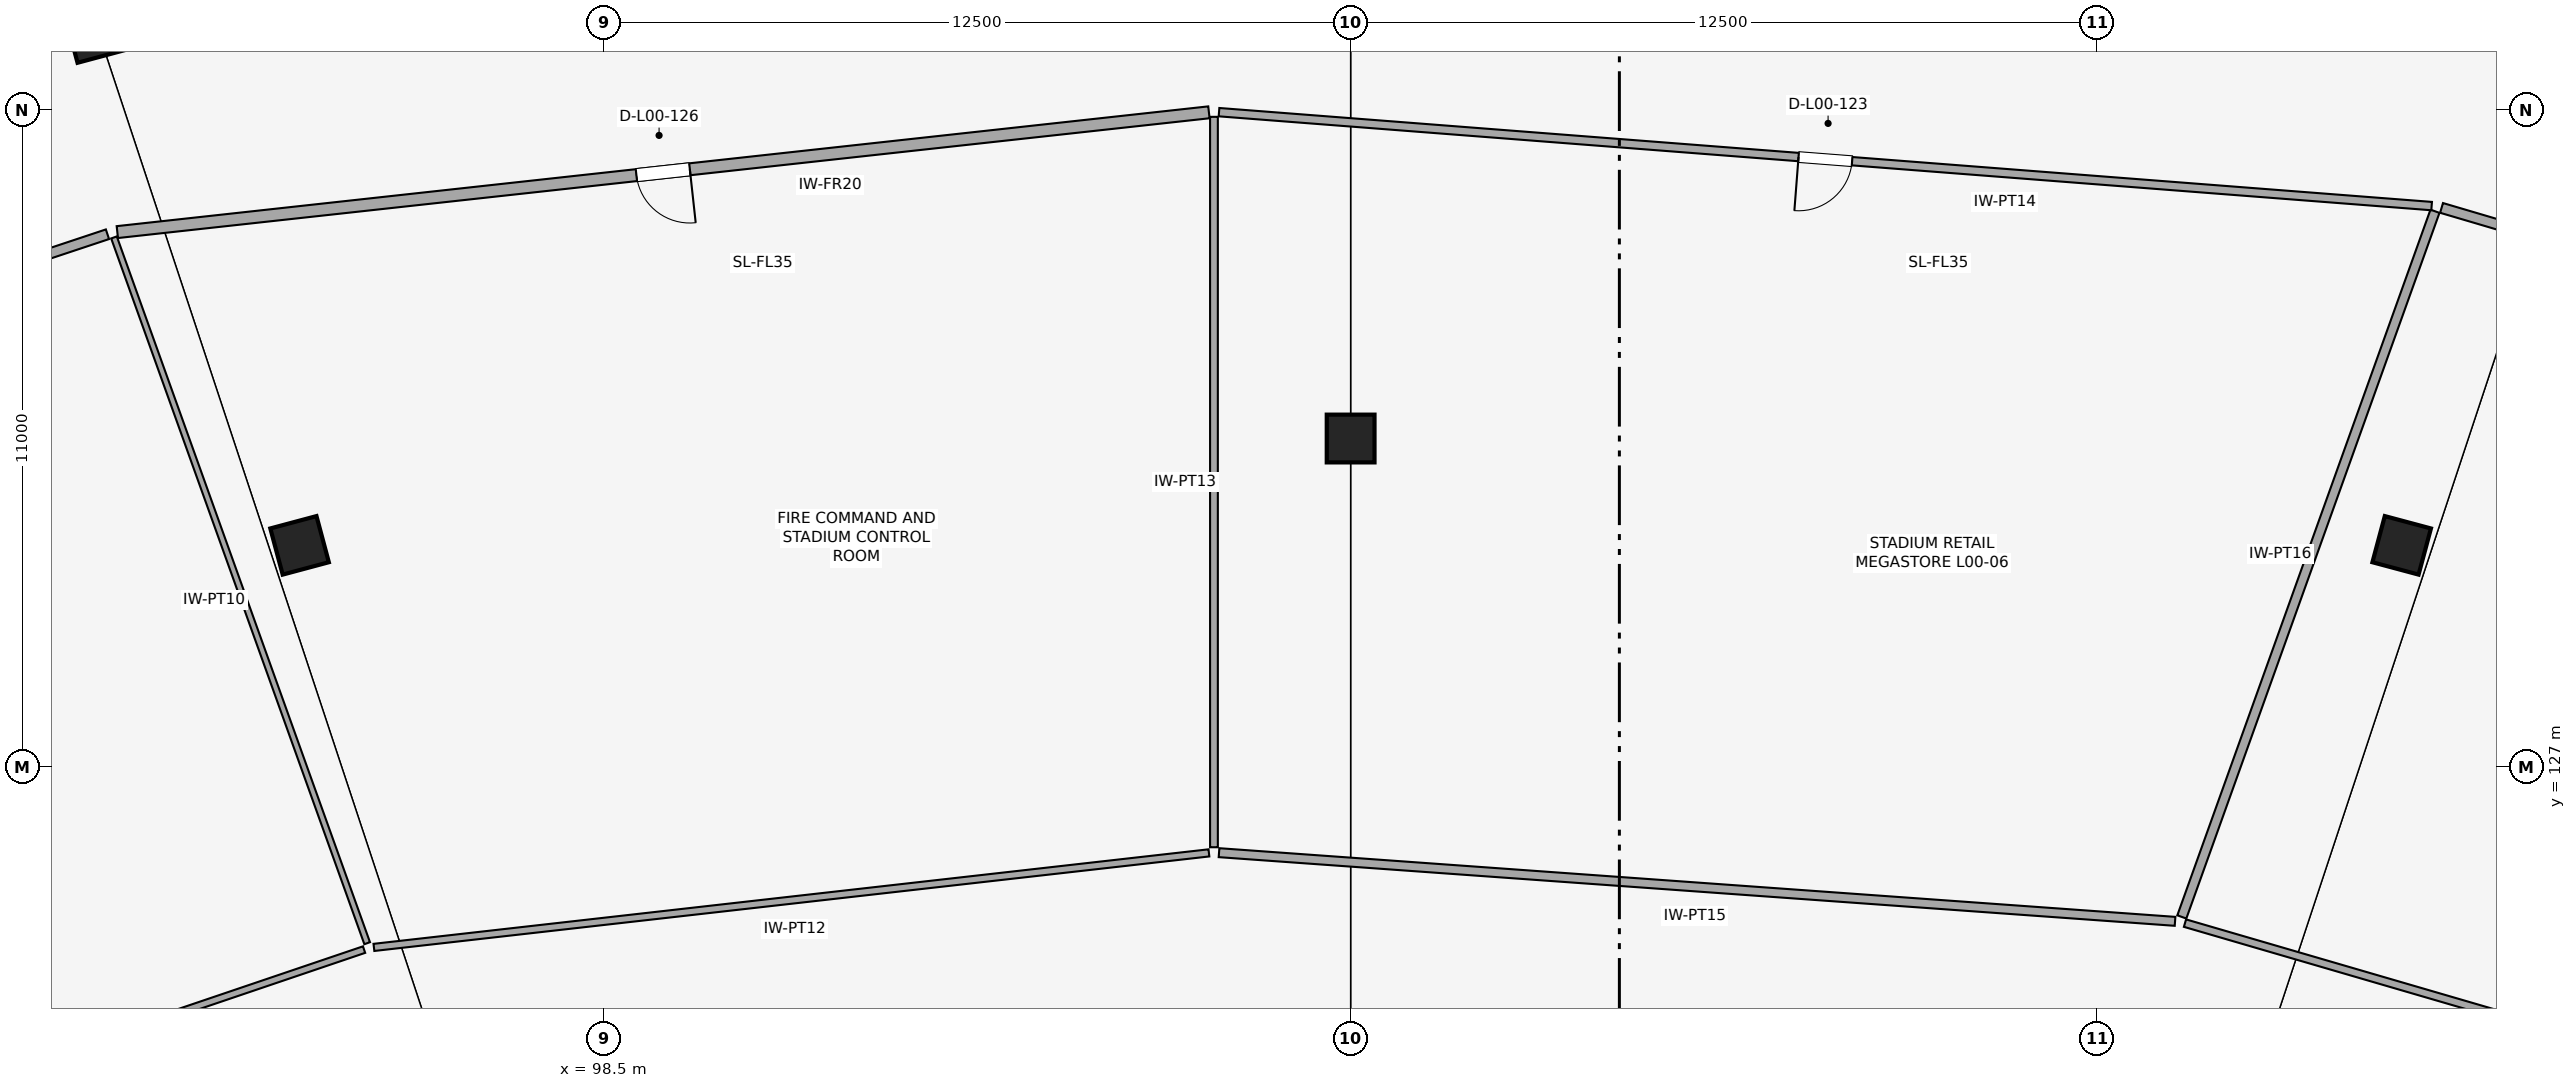
"""IFC4 building model, lengths in metres.
Left out: names, types, materials, properties, quantities, classifications, styles, units other than length and angle.
Written with IfcOpenShell. Run it as: python <this file> out.ifc"""

import sys

from ifc_helpers import new_model, si_unit, direction, frame, frame_2d, origin, origin_2d, place, context, subcontext, project, spatial, rectangle, extrude, element, fill, save


model = new_model("IFC4")
c1 = context("Model", 3, precision=1e-05, world=origin(), true_north=direction((0.0, 1.0)))
c2 = subcontext(c1, "Body", "Model", "MODEL_VIEW")
j1 = project(units=[si_unit("LENGTHUNIT", "METRE"), si_unit("PLANEANGLEUNIT", "RADIAN")], contexts=[c1])
p1 = place(None, origin())
s1 = spatial("IfcSite", under=j1, at=p1, CompositionType="ELEMENT")
p2 = place(p1, origin())
s2 = spatial("IfcBuilding", under=s1, at=p2, CompositionType="ELEMENT")
p3 = place(p2, origin())
s3 = spatial("IfcBuildingStorey", under=s2, at=p3, CompositionType="ELEMENT", Elevation=0.0)
for number, where, z_axis, x_axis in (
    (1, (128.6, 130.711, 0.0), (0.0, 0.0, 1.0), (0.259, 0.966, 0.0)),
    (2, (111.0, 132.5, 0.0), (0.0, 0.0, 1.0), (0.0, 1.0, 0.0)),
    (3, (93.4, 130.711, 0.0), (0.0, 0.0, 1.0), (-0.259, 0.966, 0.0)),
):
    element("IfcColumn", number, at=place(p3, frame(where, z_axis=z_axis, x_axis=x_axis)), inside=s3, PredefinedType="COLUMN", context=c2, shape_type="SweptSolid", body=[
        extrude(rectangle(XDim=0.8, YDim=0.8, at=origin_2d()), origin(), (0.0, 0.0, 1.0), 5.4),
    ])
p4 = place(p3, frame((90.036, 139.404, 0.0), z_axis=(0.0, 0.0, 1.0), x_axis=(-0.258819045103, 0.965925826289, 0.0)))
e4 = element("IfcColumn", 4, at=p4, inside=s3, PredefinedType="COLUMN", context=c2, shape_type="SweptSolid", body=[
    extrude(rectangle(XDim=1.0, YDim=1.0, at=origin_2d()), origin(), (0.0, 0.0, 1.0), 5.4),
])
p5 = place(p3, frame((140.208, 119.943, 0.0), z_axis=(0.0, 0.0, 1.0), x_axis=(-0.960040994117, 0.279859410446, 0.0)))
e5 = element("IfcWall", 5, at=p5, inside=s3, PredefinedType="PARTITIONING", context=c2, shape_type="SweptSolid", body=[
    extrude(rectangle(XDim=15.871, YDim=0.13, at=frame_2d((7.936, 0.0))), origin(), (0.0, 0.0, 1.0), 3.69),
])
p6 = place(p3, frame((137.382, 133.966, 0.0), z_axis=(0.0, 0.0, 1.0), x_axis=(-0.959077382298, 0.283144088345, 0.0)))
e6 = element("IfcWall", 6, at=p6, inside=s3, PredefinedType="PARTITIONING", context=c2, shape_type="SweptSolid", body=[
    extrude(rectangle(XDim=8.461, YDim=0.17, at=frame_2d((4.23, 0.0))), origin(), (0.0, 0.0, 1.0), 3.69),
])
p7 = place(p6, frame((1.1, 0.0, 0.0)))
e7 = element("IfcOpeningElement", 7, at=p7, cuts=e6, PredefinedType="OPENING", context=c2, shape_type="SweptSolid", body=[
    extrude(rectangle(XDim=1.82, YDim=2.38, at=frame_2d((0.91, 1.19))), frame((0.0, 0.095, 0.0), z_axis=(0.0, -1.0, 0.0), x_axis=(1.0, 0.0, 0.0)), (0.0, 0.0, 1.0), 0.19),
])
p8 = place(p3, frame((124.918, 124.489, 0.0), z_axis=(0.0, 0.0, 1.0), x_axis=(0.337639466365, 0.94127551267, 0.0)))
e8 = element("IfcWall", 8, at=p8, inside=s3, PredefinedType="PARTITIONING", context=c2, shape_type="SweptSolid", body=[
    extrude(rectangle(XDim=12.554, YDim=0.16, at=frame_2d((6.277, 0.0))), origin(), (0.0, 0.0, 1.0), 3.69),
])
p9 = place(p3, frame((124.805, 124.415, 0.0), z_axis=(0.0, 0.0, 1.0), x_axis=(-0.997430049468, 0.071647026582, 0.0)))
e9 = element("IfcWall", 9, at=p9, inside=s3, PredefinedType="PARTITIONING", context=c2, shape_type="SweptSolid", body=[
    extrude(rectangle(XDim=16.05, YDim=0.15, at=frame_2d((8.025, 0.0))), origin(), (0.0, 0.0, 1.0), 3.69),
])
p10 = place(p3, frame((129.101, 136.392, 0.0), z_axis=(0.0, 0.0, 1.0), x_axis=(-0.997013657181, 0.077225432307, 0.0)))
e10 = element("IfcWall", 10, at=p10, inside=s3, PredefinedType="PARTITIONING", context=c2, shape_type="SweptSolid", body=[
    extrude(rectangle(XDim=20.366, YDim=0.14, at=frame_2d((10.183, 0.0))), origin(), (0.0, 0.0, 1.0), 3.69),
])
p11 = place(p10, frame((9.733, 0.0, 0.0)))
e11 = element("IfcOpeningElement", 11, at=p11, cuts=e10, PredefinedType="OPENING", context=c2, shape_type="SweptSolid", body=[
    extrude(rectangle(XDim=0.9, YDim=2.24, at=frame_2d((0.45, 1.12))), frame((0.0, 0.08, 0.0), z_axis=(0.0, -1.0, 0.0), x_axis=(1.0, 0.0, 0.0)), (0.0, 0.0, 1.0), 0.16),
])
p12 = place(p3, frame((108.711, 125.656, 0.0), z_axis=(0.0, 0.0, 1.0), x_axis=(0.0, 1.0, 0.0)))
e12 = element("IfcWall", 12, at=p12, inside=s3, PredefinedType="PARTITIONING", context=c2, shape_type="SweptSolid", body=[
    extrude(rectangle(XDim=12.231, YDim=0.13, at=frame_2d((6.115, 0.0))), origin(), (0.0, 0.0, 1.0), 3.69),
])
p13 = place(p3, frame((108.627, 125.561, 0.0), z_axis=(0.0, 0.0, 1.0), x_axis=(-0.993653517181, -0.11248416686, 0.0)))
e13 = element("IfcWall", 13, at=p13, inside=s3, PredefinedType="PARTITIONING", context=c2, shape_type="SweptSolid", body=[
    extrude(rectangle(XDim=14.071, YDim=0.12, at=frame_2d((7.036, 0.0))), origin(), (0.0, 0.0, 1.0), 3.69),
])
p14 = place(p3, frame((108.627, 137.962, 0.0), z_axis=(0.0, 0.0, 1.0), x_axis=(-0.994034030754, -0.109070370416, 0.0)))
e14 = element("IfcWall", 14, at=p14, inside=s3, PredefinedType="PARTITIONING", context=c2, shape_type="SweptSolid", body=[
    extrude(rectangle(XDim=18.388, YDim=0.2, at=frame_2d((9.194, 0.0))), origin(), (0.0, 0.0, 1.0), 3.69),
])
p15 = place(p14, frame((8.744, 0.0, 0.0)))
e15 = element("IfcOpeningElement", 15, at=p15, cuts=e14, PredefinedType="OPENING", context=c2, shape_type="SweptSolid", body=[
    extrude(rectangle(XDim=0.9, YDim=2.38, at=frame_2d((0.45, 1.19))), frame((0.0, 0.11, 0.0), z_axis=(0.0, -1.0, 0.0), x_axis=(1.0, 0.0, 0.0)), (0.0, 0.0, 1.0), 0.22),
])
p16 = place(p3, frame((94.532, 124.049, 0.0), z_axis=(0.0, 0.0, 1.0), x_axis=(-0.337630664247, 0.94127866998, 0.0)))
e16 = element("IfcWall", 16, at=p16, inside=s3, PredefinedType="PARTITIONING", context=c2, shape_type="SweptSolid", body=[
    extrude(rectangle(XDim=12.556, YDim=0.1, at=frame_2d((6.278, 0.0))), origin(), (0.0, 0.0, 1.0), 3.69),
])
p17 = place(p3, frame((94.48, 123.942, 0.0), z_axis=(0.0, 0.0, 1.0), x_axis=(-0.947031345832, -0.321141137214, 0.0)))
e17 = element("IfcWall", 17, at=p17, inside=s3, PredefinedType="MOVABLE", context=c2, shape_type="SweptSolid", body=[
    extrude(rectangle(XDim=15.668, YDim=0.115, at=frame_2d((7.834, 0.0))), origin(), (0.0, 0.0, 1.0), 3.69),
])
p18 = place(p3, frame((90.183, 135.921, 0.0), z_axis=(0.0, 0.0, 1.0), x_axis=(-0.948842999625, -0.315748257419, 0.0)))
e18 = element("IfcWall", 18, at=p18, inside=s3, PredefinedType="PARTITIONING", context=c2, shape_type="SweptSolid", body=[
    extrude(rectangle(XDim=19.858, YDim=0.17, at=frame_2d((9.929, 0.0))), origin(), (0.0, 0.0, 1.0), 3.69),
])
p19 = place(p18, frame((9.449, 0.0, 0.0)))
e19 = element("IfcOpeningElement", 19, at=p19, cuts=e18, PredefinedType="OPENING", context=c2, shape_type="SweptSolid", body=[
    extrude(rectangle(XDim=0.96, YDim=2.1, at=frame_2d((0.48, 1.05))), frame((0.0, 0.095, 0.0), z_axis=(0.0, -1.0, 0.0), x_axis=(1.0, 0.0, 0.0)), (0.0, 0.0, 1.0), 0.19),
])
p20 = place(p11, origin())
e20 = element("IfcDoor", 20, at=p20, inside=s3, OperationType="SINGLE_SWING_RIGHT", PredefinedType="DOOR", context=c2, shape_type="SweptSolid", body=[
    extrude(rectangle(XDim=0.9, YDim=2.24, at=frame_2d((0.45, 1.12))), frame((0.0, 0.025, 0.0), z_axis=(0.0, -1.0, 0.0), x_axis=(1.0, 0.0, 0.0)), (0.0, 0.0, 1.0), 0.05),
])
fill(e11, e20)
p21 = place(p15, origin())
e21 = element("IfcDoor", 21, at=p21, inside=s3, OperationType="SINGLE_SWING_LEFT", PredefinedType="DOOR", context=c2, shape_type="SweptSolid", body=[
    extrude(rectangle(XDim=0.9, YDim=2.38, at=frame_2d((0.45, 1.19))), frame((0.0, 0.025, 0.0), z_axis=(0.0, -1.0, 0.0), x_axis=(1.0, 0.0, 0.0)), (0.0, 0.0, 1.0), 0.05),
])
fill(e15, e21)
save(model, sys.argv[1])
